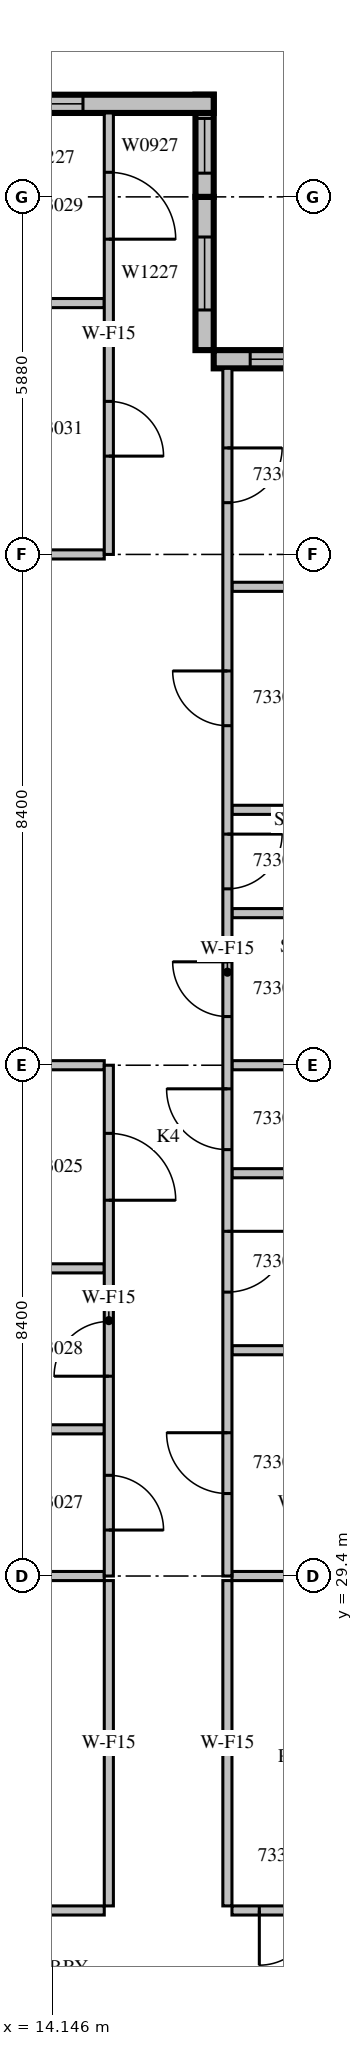
"""IFC4 building model, lengths in metres.
Left out: names, types, materials, properties, quantities, classifications, styles, units other than length and angle.
Written with IfcOpenShell. Run it as: python <this file> out.ifc"""

import sys

from ifc_helpers import new_model, si_unit, direction, frame, frame_2d, origin, place, context, subcontext, project, spatial, rectangle, extrude, source, transform, mapped, element, fill, save


model = new_model("IFC4")
c1 = context("Model", 3, precision=1e-05, world=origin(), true_north=direction((0.0, 1.0)))
c2 = subcontext(c1, "Body", "Model", "MODEL_VIEW")
j1 = project(units=[si_unit("LENGTHUNIT", "METRE"), si_unit("PLANEANGLEUNIT", "RADIAN")], contexts=[c1])
p1 = place(None, origin())
s1 = spatial("IfcSite", under=j1, at=p1, CompositionType="ELEMENT")
p2 = place(p1, origin())
s2 = spatial("IfcBuilding", under=s1, at=p2, CompositionType="ELEMENT")
p3 = place(p2, frame((0.0, 0.0, 149.7)))
s3 = spatial("IfcBuildingStorey", under=s2, at=p3, CompositionType="ELEMENT", Elevation=149.7)
m1 = source(origin(), c2, "Body", "SweptSolid", [
    extrude(rectangle(XDim=4.2, YDim=0.3, at=frame_2d((2.1, 0.0))), origin(), (0.0, 0.0, 1.0), 3.8),
])
p4 = place(p3, frame((21.0, 49.41, 0.0), z_axis=(0.0, 0.0, 1.0), x_axis=(-1.0, 0.0, 0.0)))
e1 = element("IfcWall", 1, at=p4, inside=s3, PredefinedType="STANDARD", context=c2, shape_type="MappedRepresentation", body=[
    mapped(m1, transform((0.0, 0.0, 0.0), scale=1.0)),
])
m2 = source(origin(), c2, "Body", "SweptSolid", [
    extrude(rectangle(XDim=3.0, YDim=2.7, at=frame_2d((1.5, 1.35))), frame((0.0, 0.16, 0.0), z_axis=(0.0, -1.0, 0.0), x_axis=(1.0, 0.0, 0.0)), (0.0, 0.0, 1.0), 0.32),
])
p5 = place(p4, frame((0.6, 0.0, 0.6)))
e2 = element("IfcOpeningElement", 2, at=p5, cuts=e1, PredefinedType="OPENING", context=c2, shape_type="MappedRepresentation", body=[
    mapped(m2, transform((0.0, 0.0, 0.0), scale=1.0)),
])
m3 = source(origin(), c2, "Body", "SweptSolid", [
    extrude(rectangle(XDim=2.52, YDim=0.3, at=frame_2d((1.26, 0.0))), origin(), (0.0, 0.0, 1.0), 3.8),
])
p6 = place(p3, frame((16.65, 49.56, 0.0), z_axis=(0.0, 0.0, 1.0), x_axis=(0.0, 1.0, 0.0)))
e3 = element("IfcWall", 3, at=p6, inside=s3, PredefinedType="STANDARD", context=c2, shape_type="MappedRepresentation", body=[
    mapped(m3, transform((0.0, 0.0, 0.0), scale=1.0)),
])
m4 = source(origin(), c2, "Body", "SweptSolid", [
    extrude(rectangle(XDim=1.2, YDim=2.7, at=frame_2d((0.6, 1.35))), frame((0.0, 0.16, 0.0), z_axis=(0.0, -1.0, 0.0), x_axis=(1.0, 0.0, 0.0)), (0.0, 0.0, 1.0), 0.32),
])
p7 = place(p6, frame((0.66, 0.0, 0.6)))
e4 = element("IfcOpeningElement", 4, at=p7, cuts=e3, PredefinedType="OPENING", context=c2, shape_type="MappedRepresentation", body=[
    mapped(m4, transform((0.0, 0.0, 0.0), scale=1.0)),
])
m5 = source(origin(), c2, "Body", "SweptSolid", [
    extrude(rectangle(XDim=1.68, YDim=0.3, at=frame_2d((0.84, 0.0))), origin(), (0.0, 0.0, 1.0), 3.8),
])
p8 = place(p3, frame((16.65, 52.08, 0.0), z_axis=(0.0, 0.0, 1.0), x_axis=(0.0, 1.0, 0.0)))
e5 = element("IfcWall", 5, at=p8, inside=s3, PredefinedType="STANDARD", context=c2, shape_type="MappedRepresentation", body=[
    mapped(m5, transform((0.0, 0.0, 0.0), scale=1.0)),
])
m6 = source(origin(), c2, "Body", "SweptSolid", [
    extrude(rectangle(XDim=0.9, YDim=2.7, at=frame_2d((0.45, 1.35))), frame((0.0, 0.16, 0.0), z_axis=(0.0, -1.0, 0.0), x_axis=(1.0, 0.0, 0.0)), (0.0, 0.0, 1.0), 0.32),
])
p9 = place(p8, frame((0.39, 0.0, 0.6)))
e6 = element("IfcOpeningElement", 6, at=p9, cuts=e5, PredefinedType="OPENING", context=c2, shape_type="MappedRepresentation", body=[
    mapped(m6, transform((0.0, 0.0, 0.0), scale=1.0)),
])
m7 = source(origin(), c2, "Body", "SweptSolid", [
    extrude(rectangle(XDim=10.5, YDim=0.3, at=frame_2d((5.25, 0.0))), origin(), (0.0, 0.0, 1.0), 3.8),
])
p10 = place(p3, frame((16.8, 53.61, 0.0), z_axis=(0.0, 0.0, 1.0), x_axis=(-1.0, 0.0, 0.0)))
e7 = element("IfcWall", 7, at=p10, inside=s3, PredefinedType="STANDARD", context=c2, shape_type="MappedRepresentation", body=[
    mapped(m7, transform((0.0, 0.0, 0.0), scale=1.0)),
])
p11 = place(p10, frame((2.15, 0.0, 0.6)))
e8 = element("IfcOpeningElement", 8, at=p11, cuts=e7, PredefinedType="OPENING", context=c2, shape_type="MappedRepresentation", body=[
    mapped(m4, transform((0.0, 0.0, 0.0), scale=1.0)),
])
m8 = source(origin(), c2, "Body", "SweptSolid", [
    extrude(rectangle(XDim=1.8, YDim=2.7, at=frame_2d((0.9, 1.35))), frame((0.0, 0.16, 0.0), z_axis=(0.0, -1.0, 0.0), x_axis=(1.0, 0.0, 0.0)), (0.0, 0.0, 1.0), 0.32),
])
p12 = place(p10, frame((8.025, 0.0, 0.6)))
e9 = element("IfcOpeningElement", 9, at=p12, cuts=e7, PredefinedType="OPENING", context=c2, shape_type="MappedRepresentation", body=[
    mapped(m8, transform((0.0, 0.0, 0.0), scale=1.0)),
])
m9 = source(origin(), c2, "Body", "SweptSolid", [
    extrude(rectangle(XDim=8.495, YDim=0.15, at=frame_2d((4.247, 0.0))), origin(), (0.0, 0.0, 1.0), 3.8),
])
p13 = place(p3, frame((6.505, 23.9, 0.0), z_axis=(0.0, 0.0, 1.0), x_axis=(1.0, 0.0, 0.0)))
e10 = element("IfcWall", 10, at=p13, inside=s3, PredefinedType="PARTITIONING", context=c2, shape_type="MappedRepresentation", body=[
    mapped(m9, transform((0.0, 0.0, 0.0), scale=1.0)),
])
m10 = source(origin(), c2, "Body", "SweptSolid", [
    extrude(rectangle(XDim=0.9, YDim=2.1, at=frame_2d((0.45, 1.05))), frame((0.0, 0.085, 0.0), z_axis=(0.0, -1.0, 0.0), x_axis=(1.0, 0.0, 0.0)), (0.0, 0.0, 1.0), 0.17),
])
p14 = place(p13, frame((1.045, 0.0, 0.0)))
e11 = element("IfcOpeningElement", 11, at=p14, cuts=e10, PredefinedType="OPENING", context=c2, shape_type="MappedRepresentation", body=[
    mapped(m10, transform((0.0, 0.0, 0.0), scale=1.0)),
])
p15 = place(p13, frame((6.12, 0.0, 0.0)))
e12 = element("IfcOpeningElement", 12, at=p15, cuts=e10, PredefinedType="OPENING", context=c2, shape_type="MappedRepresentation", body=[
    mapped(m10, transform((0.0, 0.0, 0.0), scale=1.0)),
])
m11 = source(origin(), c2, "Body", "SweptSolid", [
    extrude(rectangle(XDim=3.6, YDim=0.15, at=frame_2d((1.8, 0.0))), origin(), (0.0, 0.0, 1.0), 3.8),
])
p16 = place(p3, frame((17.1, 23.9, 0.0), z_axis=(0.0, 0.0, 1.0), x_axis=(1.0, 0.0, 0.0)))
e13 = element("IfcWall", 13, at=p16, inside=s3, PredefinedType="PARTITIONING", context=c2, shape_type="MappedRepresentation", body=[
    mapped(m11, transform((0.0, 0.0, 0.0), scale=1.0)),
])
p17 = place(p16, frame((0.45, 0.0, 0.0)))
e14 = element("IfcOpeningElement", 14, at=p17, cuts=e13, PredefinedType="OPENING", context=c2, shape_type="MappedRepresentation", body=[
    mapped(m10, transform((0.0, 0.0, 0.0), scale=1.0)),
])
m12 = source(origin(), c2, "Body", "SweptSolid", [
    extrude(rectangle(XDim=5.35, YDim=0.15, at=frame_2d((2.675, 0.0))), origin(), (0.0, 0.0, 1.0), 3.8),
])
for number, where, z_axis, x_axis in (
    (15, (15.075, 23.975, 0.0), (0.0, 0.0, 1.0), (0.0, 1.0, 0.0)),
    (16, (17.025, 29.325, 0.0), (0.0, 0.0, 1.0), (0.0, -1.0, 0.0)),
):
    element("IfcWall", number, at=place(p3, frame(where, z_axis=z_axis, x_axis=x_axis)), inside=s3, PredefinedType="PARTITIONING", context=c2, shape_type="MappedRepresentation", body=[
        mapped(m12, transform((0.0, 0.0, 0.0), scale=1.0)),
    ])
m13 = source(origin(), c2, "Body", "SweptSolid", [
    extrude(rectangle(XDim=3.976, YDim=0.15, at=frame_2d((1.988, 0.0))), origin(), (0.0, 0.0, 1.0), 3.8),
])
p18 = place(p3, frame((15.0, 29.4, 0.0), z_axis=(0.0, 0.0, 1.0), x_axis=(-1.0, 0.0, 0.0)))
e17 = element("IfcWall", 17, at=p18, inside=s3, PredefinedType="PARTITIONING", context=c2, shape_type="MappedRepresentation", body=[
    mapped(m13, transform((0.0, 0.0, 0.0), scale=1.0)),
])
m14 = source(origin(), c2, "Body", "SweptSolid", [
    extrude(rectangle(XDim=2.851, YDim=0.15, at=frame_2d((1.425, 0.0))), origin(), (0.0, 0.0, 1.0), 3.8),
])
p19 = place(p3, frame((19.951, 29.4, 0.0), z_axis=(0.0, 0.0, 1.0), x_axis=(-1.0, 0.0, 0.0)))
e18 = element("IfcWall", 18, at=p19, inside=s3, PredefinedType="PARTITIONING", context=c2, shape_type="MappedRepresentation", body=[
    mapped(m14, transform((0.0, 0.0, 0.0), scale=1.0)),
])
m15 = source(origin(), c2, "Body", "SweptSolid", [
    extrude(rectangle(XDim=3.825, YDim=0.15, at=frame_2d((1.913, 0.0))), origin(), (0.0, 0.0, 1.0), 3.8),
])
for number, where, z_axis, x_axis in (
    (19, (15.0, 31.812, 0.0), (0.0, 0.0, 1.0), (-1.0, 0.0, 0.0)),
    (20, (15.0, 34.459, 0.0), (0.0, 0.0, 1.0), (-1.0, 0.0, 0.0)),
    (21, (15.0, 37.8, 0.0), (0.0, 0.0, 1.0), (-1.0, 0.0, 0.0)),
    (22, (15.0, 50.334, 0.0), (0.0, 0.0, 1.0), (-1.0, 0.0, 0.0)),
    (23, (15.0, 46.2, 0.0), (0.0, 0.0, 1.0), (-1.0, 0.0, 0.0)),
):
    element("IfcWall", number, at=place(p3, frame(where, z_axis=z_axis, x_axis=x_axis)), inside=s3, PredefinedType="PARTITIONING", context=c2, shape_type="MappedRepresentation", body=[
        mapped(m15, transform((0.0, 0.0, 0.0), scale=1.0)),
    ])
for number, where, z_axis, x_axis in (
    (24, (17.1, 33.113, 0.0), (0.0, 0.0, 1.0), (1.0, 0.0, 0.0)),
    (25, (17.1, 36.024, 0.0), (0.0, 0.0, 1.0), (1.0, 0.0, 0.0)),
    (26, (17.1, 40.301, 0.0), (0.0, 0.0, 1.0), (1.0, 0.0, 0.0)),
    (27, (17.1, 45.667, 0.0), (0.0, 0.0, 1.0), (1.0, 0.0, 0.0)),
):
    element("IfcWall", number, at=place(p3, frame(where, z_axis=z_axis, x_axis=x_axis)), inside=s3, PredefinedType="PARTITIONING", context=c2, shape_type="MappedRepresentation", body=[
        mapped(m11, transform((0.0, 0.0, 0.0), scale=1.0)),
    ])
p20 = place(p3, frame((19.951, 37.8, 0.0), z_axis=(0.0, 0.0, 1.0), x_axis=(-1.0, 0.0, 0.0)))
e28 = element("IfcWall", 28, at=p20, inside=s3, PredefinedType="PARTITIONING", context=c2, shape_type="MappedRepresentation", body=[
    mapped(m14, transform((0.0, 0.0, 0.0), scale=1.0)),
])
p21 = place(p3, frame((20.7, 42.0, 0.0), z_axis=(0.0, 0.0, 1.0), x_axis=(-1.0, 0.0, 0.0)))
e29 = element("IfcWall", 29, at=p21, inside=s3, PredefinedType="PARTITIONING", context=c2, shape_type="MappedRepresentation", body=[
    mapped(m11, transform((0.0, 0.0, 0.0), scale=1.0)),
])
m16 = source(origin(), c2, "Body", "SweptSolid", [
    extrude(rectangle(XDim=8.4, YDim=0.15, at=frame_2d((4.2, 0.0))), origin(), (0.0, 0.0, 1.0), 3.8),
])
p22 = place(p3, frame((15.075, 29.4, 0.0), z_axis=(0.0, 0.0, 1.0), x_axis=(0.0, 1.0, 0.0)))
e30 = element("IfcWall", 30, at=p22, inside=s3, PredefinedType="PARTITIONING", context=c2, shape_type="MappedRepresentation", body=[
    mapped(m16, transform((0.0, 0.0, 0.0), scale=1.0)),
])
m17 = source(origin(), c2, "Body", "SweptSolid", [
    extrude(rectangle(XDim=1.1, YDim=2.1, at=frame_2d((0.55, 1.05))), frame((0.0, 0.085, 0.0), z_axis=(0.0, -1.0, 0.0), x_axis=(1.0, 0.0, 0.0)), (0.0, 0.0, 1.0), 0.17),
])
p23 = place(p22, frame((6.18, 0.0, 0.0)))
e31 = element("IfcOpeningElement", 31, at=p23, cuts=e30, PredefinedType="OPENING", context=c2, shape_type="MappedRepresentation", body=[
    mapped(m17, transform((0.0, 0.0, 0.0), scale=1.0)),
])
p24 = place(p22, frame((0.756, 0.0, 0.0)))
e32 = element("IfcOpeningElement", 32, at=p24, cuts=e30, PredefinedType="OPENING", context=c2, shape_type="MappedRepresentation", body=[
    mapped(m10, transform((0.0, 0.0, 0.0), scale=1.0)),
])
p25 = place(p22, frame((3.286, 0.0, 0.0)))
e33 = element("IfcOpeningElement", 33, at=p25, cuts=e30, PredefinedType="OPENING", context=c2, shape_type="MappedRepresentation", body=[
    mapped(m10, transform((0.0, 0.0, 0.0), scale=1.0)),
])
m18 = source(origin(), c2, "Body", "SweptSolid", [
    extrude(rectangle(XDim=7.26, YDim=0.15, at=frame_2d((3.63, 0.0))), origin(), (0.0, 0.0, 1.0), 3.8),
])
p26 = place(p3, frame((15.075, 46.2, 0.0), z_axis=(0.0, 0.0, 1.0), x_axis=(0.0, 1.0, 0.0)))
e34 = element("IfcWall", 34, at=p26, inside=s3, PredefinedType="PARTITIONING", context=c2, shape_type="MappedRepresentation", body=[
    mapped(m18, transform((0.0, 0.0, 0.0), scale=1.0)),
])
p27 = place(p26, frame((5.184, 0.0, 0.0)))
e35 = element("IfcOpeningElement", 35, at=p27, cuts=e34, PredefinedType="OPENING", context=c2, shape_type="MappedRepresentation", body=[
    mapped(m17, transform((0.0, 0.0, 0.0), scale=1.0)),
])
p28 = place(p26, frame((1.617, 0.0, 0.0)))
e36 = element("IfcOpeningElement", 36, at=p28, cuts=e34, PredefinedType="OPENING", context=c2, shape_type="MappedRepresentation", body=[
    mapped(m10, transform((0.0, 0.0, 0.0), scale=1.0)),
])
m19 = source(origin(), c2, "Body", "SweptSolid", [
    extrude(rectangle(XDim=19.86, YDim=0.15, at=frame_2d((9.93, 0.0))), origin(), (0.0, 0.0, 1.0), 3.8),
])
p29 = place(p3, frame((17.025, 49.26, 0.0), z_axis=(0.0, 0.0, 1.0), x_axis=(0.0, -1.0, 0.0)))
e37 = element("IfcWall", 37, at=p29, inside=s3, PredefinedType="PARTITIONING", context=c2, shape_type="MappedRepresentation", body=[
    mapped(m19, transform((0.0, 0.0, 0.0), scale=1.0)),
])
m20 = source(origin(), c2, "Body", "SweptSolid", [
    extrude(rectangle(XDim=1.0, YDim=2.1, at=frame_2d((0.5, 1.05))), frame((0.0, 0.085, 0.0), z_axis=(0.0, -1.0, 0.0), x_axis=(1.0, 0.0, 0.0)), (0.0, 0.0, 1.0), 0.17),
])
p30 = place(p29, frame((17.503, 0.0, 0.0)))
e38 = element("IfcOpeningElement", 38, at=p30, cuts=e37, PredefinedType="OPENING", context=c2, shape_type="MappedRepresentation", body=[
    mapped(m20, transform((0.0, 0.0, 0.0), scale=1.0)),
])
p31 = place(p29, frame((14.191, 0.0, 0.0)))
e39 = element("IfcOpeningElement", 39, at=p31, cuts=e37, PredefinedType="OPENING", context=c2, shape_type="MappedRepresentation", body=[
    mapped(m20, transform((0.0, 0.0, 0.0), scale=1.0)),
])
p32 = place(p29, frame((11.848, 0.0, 0.0)))
e40 = element("IfcOpeningElement", 40, at=p32, cuts=e37, PredefinedType="OPENING", context=c2, shape_type="MappedRepresentation", body=[
    mapped(m20, transform((0.0, 0.0, 0.0), scale=1.0)),
])
p33 = place(p29, frame((9.759, 0.0, 0.0)))
e41 = element("IfcOpeningElement", 41, at=p33, cuts=e37, PredefinedType="OPENING", context=c2, shape_type="MappedRepresentation", body=[
    mapped(m10, transform((0.0, 0.0, 0.0), scale=1.0)),
])
p34 = place(p29, frame((7.659, 0.0, 0.0)))
e42 = element("IfcOpeningElement", 42, at=p34, cuts=e37, PredefinedType="OPENING", context=c2, shape_type="MappedRepresentation", body=[
    mapped(m10, transform((0.0, 0.0, 0.0), scale=1.0)),
])
p35 = place(p29, frame((4.976, 0.0, 0.0)))
e43 = element("IfcOpeningElement", 43, at=p35, cuts=e37, PredefinedType="OPENING", context=c2, shape_type="MappedRepresentation", body=[
    mapped(m10, transform((0.0, 0.0, 0.0), scale=1.0)),
])
p36 = place(p29, frame((1.309, 0.0, 0.0)))
e44 = element("IfcOpeningElement", 44, at=p36, cuts=e37, PredefinedType="OPENING", context=c2, shape_type="MappedRepresentation", body=[
    mapped(m10, transform((0.0, 0.0, 0.0), scale=1.0)),
])
m21 = source(origin(), c2, "Body", "SweptSolid", [
    extrude(rectangle(XDim=3.0, YDim=2.7, at=frame_2d((1.5, 1.35))), frame((0.0, 0.03, 0.0), z_axis=(0.0, -1.0, 0.0), x_axis=(1.0, 0.0, 0.0)), (0.0, 0.0, 1.0), 0.06),
])
p37 = place(p5, origin())
e45 = element("IfcWindow", 45, at=p37, inside=s3, PartitioningType="SINGLE_PANEL", PredefinedType="WINDOW", context=c2, shape_type="MappedRepresentation", body=[
    mapped(m21, transform((0.0, 0.0, 0.0), scale=1.0)),
])
fill(e2, e45)
m22 = source(origin(), c2, "Body", "SweptSolid", [
    extrude(rectangle(XDim=1.2, YDim=2.7, at=frame_2d((0.6, 1.35))), frame((0.0, 0.03, 0.0), z_axis=(0.0, -1.0, 0.0), x_axis=(1.0, 0.0, 0.0)), (0.0, 0.0, 1.0), 0.06),
])
p38 = place(p7, origin())
e46 = element("IfcWindow", 46, at=p38, inside=s3, PartitioningType="SINGLE_PANEL", PredefinedType="WINDOW", context=c2, shape_type="MappedRepresentation", body=[
    mapped(m22, transform((0.0, 0.0, 0.0), scale=1.0)),
])
fill(e4, e46)
m23 = source(origin(), c2, "Body", "SweptSolid", [
    extrude(rectangle(XDim=0.9, YDim=2.7, at=frame_2d((0.45, 1.35))), frame((0.0, 0.03, 0.0), z_axis=(0.0, -1.0, 0.0), x_axis=(1.0, 0.0, 0.0)), (0.0, 0.0, 1.0), 0.06),
])
p39 = place(p9, origin())
e47 = element("IfcWindow", 47, at=p39, inside=s3, PartitioningType="SINGLE_PANEL", PredefinedType="WINDOW", context=c2, shape_type="MappedRepresentation", body=[
    mapped(m23, transform((0.0, 0.0, 0.0), scale=1.0)),
])
fill(e6, e47)
p40 = place(p11, origin())
e48 = element("IfcWindow", 48, at=p40, inside=s3, PartitioningType="SINGLE_PANEL", PredefinedType="WINDOW", context=c2, shape_type="MappedRepresentation", body=[
    mapped(m22, transform((0.0, 0.0, 0.0), scale=1.0)),
])
fill(e8, e48)
m24 = source(origin(), c2, "Body", "SweptSolid", [
    extrude(rectangle(XDim=0.9, YDim=2.1, at=frame_2d((0.45, 1.05))), frame((0.0, 0.025, 0.0), z_axis=(0.0, -1.0, 0.0), x_axis=(1.0, 0.0, 0.0)), (0.0, 0.0, 1.0), 0.05),
])
p41 = place(p17, origin())
e49 = element("IfcDoor", 49, at=p41, inside=s3, OperationType="SINGLE_SWING_RIGHT", PredefinedType="DOOR", context=c2, shape_type="MappedRepresentation", body=[
    mapped(m24, transform((0.0, 0.0, 0.0), scale=1.0)),
])
fill(e14, e49)
m25 = source(origin(), c2, "Body", "SweptSolid", [
    extrude(rectangle(XDim=1.1, YDim=2.1, at=frame_2d((0.55, 1.05))), frame((0.0, 0.025, 0.0), z_axis=(0.0, -1.0, 0.0), x_axis=(1.0, 0.0, 0.0)), (0.0, 0.0, 1.0), 0.05),
])
p42 = place(p23, origin())
e50 = element("IfcDoor", 50, at=p42, inside=s3, OperationType="SINGLE_SWING_RIGHT", PredefinedType="DOOR", context=c2, shape_type="MappedRepresentation", body=[
    mapped(m25, transform((0.0, 0.0, 0.0), scale=1.0)),
])
fill(e31, e50)
p43 = place(p24, origin())
e51 = element("IfcDoor", 51, at=p43, inside=s3, OperationType="SINGLE_SWING_RIGHT", PredefinedType="DOOR", context=c2, shape_type="MappedRepresentation", body=[
    mapped(m24, transform((0.0, 0.0, 0.0), scale=1.0)),
])
fill(e32, e51)
p44 = place(p25, origin())
e52 = element("IfcDoor", 52, at=p44, inside=s3, OperationType="SINGLE_SWING_LEFT", PredefinedType="DOOR", context=c2, shape_type="MappedRepresentation", body=[
    mapped(m24, transform((0.0, 0.0, 0.0), scale=1.0)),
])
fill(e33, e52)
p45 = place(p27, origin())
e53 = element("IfcDoor", 53, at=p45, inside=s3, OperationType="SINGLE_SWING_RIGHT", PredefinedType="DOOR", context=c2, shape_type="MappedRepresentation", body=[
    mapped(m25, transform((0.0, 0.0, 0.0), scale=1.0)),
])
fill(e35, e53)
p46 = place(p28, origin())
e54 = element("IfcDoor", 54, at=p46, inside=s3, OperationType="SINGLE_SWING_RIGHT", PredefinedType="DOOR", context=c2, shape_type="MappedRepresentation", body=[
    mapped(m24, transform((0.0, 0.0, 0.0), scale=1.0)),
])
fill(e36, e54)
m26 = source(origin(), c2, "Body", "SweptSolid", [
    extrude(rectangle(XDim=1.0, YDim=2.1, at=frame_2d((0.5, 1.05))), frame((0.0, 0.025, 0.0), z_axis=(0.0, -1.0, 0.0), x_axis=(1.0, 0.0, 0.0)), (0.0, 0.0, 1.0), 0.05),
])
p47 = place(p30, origin())
e55 = element("IfcDoor", 55, at=p47, inside=s3, OperationType="SINGLE_SWING_RIGHT", PredefinedType="DOOR", context=c2, shape_type="MappedRepresentation", body=[
    mapped(m26, transform((0.0, 0.0, 0.0), scale=1.0)),
])
fill(e38, e55)
p48 = place(p31, origin())
e56 = element("IfcDoor", 56, at=p48, inside=s3, OperationType="SINGLE_SWING_LEFT", PredefinedType="DOOR", context=c2, shape_type="MappedRepresentation", body=[
    mapped(m26, transform((0.0, 0.0, 0.0), scale=1.0)),
])
fill(e39, e56)
p49 = place(p32, origin())
e57 = element("IfcDoor", 57, at=p49, inside=s3, OperationType="SINGLE_SWING_RIGHT", PredefinedType="DOOR", context=c2, shape_type="MappedRepresentation", body=[
    mapped(m26, transform((0.0, 0.0, 0.0), scale=1.0)),
])
fill(e40, e57)
p50 = place(p33, origin())
e58 = element("IfcDoor", 58, at=p50, inside=s3, OperationType="SINGLE_SWING_RIGHT", PredefinedType="DOOR", context=c2, shape_type="MappedRepresentation", body=[
    mapped(m24, transform((0.0, 0.0, 0.0), scale=1.0)),
])
fill(e41, e58)
p51 = place(p34, origin())
e59 = element("IfcDoor", 59, at=p51, inside=s3, OperationType="SINGLE_SWING_LEFT", PredefinedType="DOOR", context=c2, shape_type="MappedRepresentation", body=[
    mapped(m24, transform((0.0, 0.0, 0.0), scale=1.0)),
])
fill(e42, e59)
p52 = place(p35, origin())
e60 = element("IfcDoor", 60, at=p52, inside=s3, OperationType="SINGLE_SWING_RIGHT", PredefinedType="DOOR", context=c2, shape_type="MappedRepresentation", body=[
    mapped(m24, transform((0.0, 0.0, 0.0), scale=1.0)),
])
fill(e43, e60)
p53 = place(p36, origin())
e61 = element("IfcDoor", 61, at=p53, inside=s3, OperationType="SINGLE_SWING_LEFT", PredefinedType="DOOR", context=c2, shape_type="MappedRepresentation", body=[
    mapped(m24, transform((0.0, 0.0, 0.0), scale=1.0)),
])
fill(e44, e61)
save(model, sys.argv[1])
